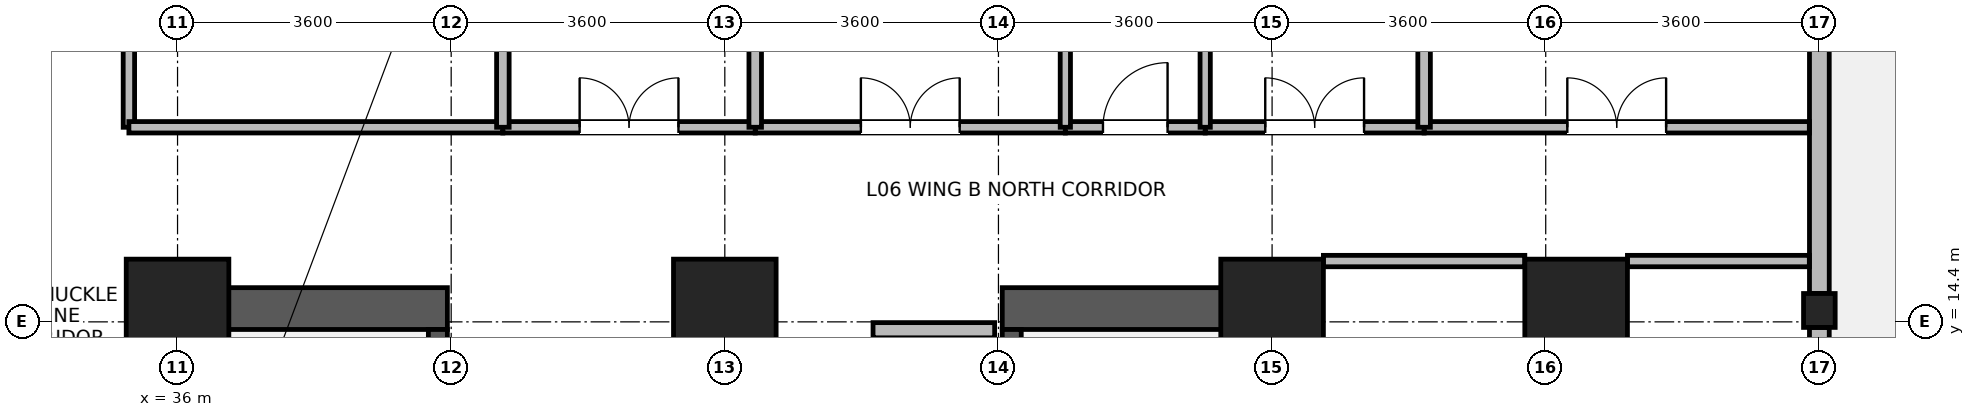
"""IFC4 building model, lengths in metres.
Left out: names, types, materials, properties, quantities, classifications, styles, units other than length and angle.
Written with IfcOpenShell. Run it as: python <this file> out.ifc"""

import sys

from ifc_helpers import new_model, si_unit, direction, frame, frame_2d, origin, origin_2d, place, context, subcontext, project, spatial, rectangle, i_section, extrude, source, transform, mapped, element, fill, save


model = new_model("IFC4")
c1 = context("Model", 3, precision=1e-05, world=origin(), true_north=direction((0.0, 1.0)))
c2 = subcontext(c1, "Body", "Model", "MODEL_VIEW")
j1 = project(units=[si_unit("LENGTHUNIT", "METRE"), si_unit("PLANEANGLEUNIT", "RADIAN")], contexts=[c1])
p1 = place(None, origin())
s1 = spatial("IfcSite", under=j1, at=p1, CompositionType="ELEMENT")
p2 = place(p1, origin())
s2 = spatial("IfcBuilding", under=s1, at=p2, CompositionType="ELEMENT")
p3 = place(p2, frame((0.0, 0.0, 29.0)))
s3 = spatial("IfcBuildingStorey", under=s2, at=p3, CompositionType="ELEMENT", Elevation=29.0)
for number, where, z_axis, x_axis in (
    (1, (36.075, 6.75, 0.0), (0.0, 0.0, 1.0), (0.0, 1.0, 0.0)),
    (2, (50.325, 6.75, 0.0), (0.0, 0.0, 1.0), (0.0, 1.0, 0.0)),
):
    element("IfcWall", number, at=place(p3, frame(where, z_axis=z_axis, x_axis=x_axis)), inside=s3, PredefinedType="SHEAR", context=c2, shape_type="SweptSolid", body=[
        extrude(rectangle(XDim=8.1, YDim=0.55, at=frame_2d((4.05, 0.0))), origin(), (0.0, 0.0, 1.0), 3.45),
    ])
for number, where, z_axis, x_axis in (
    (3, (36.35, 14.575, 0.0), (0.0, 0.0, 1.0), (1.0, 0.0, 0.0)),
    (4, (46.85, 14.575, 0.0), (0.0, 0.0, 1.0), (1.0, 0.0, 0.0)),
):
    element("IfcWall", number, at=place(p3, frame(where, z_axis=z_axis, x_axis=x_axis)), inside=s3, PredefinedType="SHEAR", context=c2, shape_type="SweptSolid", body=[
        extrude(rectangle(XDim=3.2, YDim=0.55, at=frame_2d((1.6, 0.0))), origin(), (0.0, 0.0, 1.0), 3.45),
    ])
p4 = place(p3, frame((39.425, 7.3, 0.0), z_axis=(0.0, 0.0, 1.0), x_axis=(0.0, 1.0, 0.0)))
e5 = element("IfcWall", 5, at=p4, inside=s3, PredefinedType="SHEAR", context=c2, shape_type="SweptSolid", body=[
    extrude(rectangle(XDim=7.0, YDim=0.25, at=frame_2d((3.5, 0.0))), origin(), (0.0, 0.0, 1.0), 3.45),
])
p5 = place(p4, frame((0.15, 0.0, 0.0)))
e6 = element("IfcOpeningElement", 6, at=p5, cuts=e5, PredefinedType="OPENING", context=c2, shape_type="SweptSolid", body=[
    extrude(rectangle(XDim=1.1, YDim=2.08, at=frame_2d((0.55, 1.04))), frame((0.0, 0.135, 0.0), z_axis=(0.0, -1.0, 0.0), x_axis=(1.0, 0.0, 0.0)), (0.0, 0.0, 1.0), 0.27),
])
p6 = place(p3, frame((46.975, 7.3, 0.0), z_axis=(0.0, 0.0, 1.0), x_axis=(0.0, 1.0, 0.0)))
e7 = element("IfcWall", 7, at=p6, inside=s3, PredefinedType="SHEAR", context=c2, shape_type="SweptSolid", body=[
    extrude(rectangle(XDim=7.0, YDim=0.25, at=frame_2d((3.5, 0.0))), origin(), (0.0, 0.0, 1.0), 3.45),
])
p7 = place(p6, frame((0.15, 0.0, 0.0)))
e8 = element("IfcOpeningElement", 8, at=p7, cuts=e7, PredefinedType="OPENING", context=c2, shape_type="SweptSolid", body=[
    extrude(rectangle(XDim=1.1, YDim=2.08, at=frame_2d((0.55, 1.04))), frame((0.0, 0.135, 0.0), z_axis=(0.0, -1.0, 0.0), x_axis=(1.0, 0.0, 0.0)), (0.0, 0.0, 1.0), 0.27),
])
m1 = source(origin(), c2, "Body", "SweptSolid", [
    extrude(rectangle(XDim=1.35, YDim=1.35, at=origin_2d()), origin(), (0.0, 0.0, 1.0), 3.7),
])
for number, where, z_axis, x_axis in (
    (9, (36.0, 14.55, 0.0), (0.0, 0.0, 1.0), (1.0, 0.0, 0.0)),
    (10, (43.2, 14.55, 0.0), (0.0, 0.0, 1.0), (1.0, 0.0, 0.0)),
    (11, (50.4, 14.55, 0.0), (0.0, 0.0, 1.0), (1.0, 0.0, 0.0)),
    (12, (54.4, 14.55, 0.0), (0.0, 0.0, 1.0), (1.0, 0.0, 0.0)),
):
    element("IfcColumn", number, at=place(p3, frame(where, z_axis=z_axis, x_axis=x_axis)), inside=s3, PredefinedType="COLUMN", context=c2, shape_type="MappedRepresentation", body=[
        mapped(m1, transform((0.0, 0.0, 0.0), x_axis=(1.0, 0.0, 0.0), y_axis=(0.0, 1.0, 0.0), z_axis=(0.0, 0.0, 1.0), scale=1.0)),
    ])
m2 = source(origin(), c2, "Body", "SweptSolid", [
    extrude(i_section(OverallWidth=0.416, OverallDepth=0.446, WebThickness=0.029, FlangeThickness=0.04, FilletRadius=0.015, at=origin_2d()), origin(), (0.0, 0.0, 1.0), 3.7),
])
p8 = place(p3, frame((57.6, 14.55, 0.0), z_axis=(0.0, 0.0, 1.0), x_axis=(1.0, 0.0, 0.0)))
e13 = element("IfcColumn", 13, at=p8, inside=s3, PredefinedType="COLUMN", context=c2, shape_type="MappedRepresentation", body=[
    mapped(m2, transform((0.0, 0.0, 0.0), x_axis=(1.0, 0.0, 0.0), y_axis=(0.0, 1.0, 0.0), z_axis=(0.0, 0.0, 1.0), scale=1.0)),
])
p9 = place(p3, frame((57.6, 14.326, 0.0), z_axis=(0.0, 0.0, 1.0), x_axis=(0.0, -1.0, 0.0)))
e14 = element("IfcWall", 14, at=p9, inside=s3, PredefinedType="STANDARD", context=c2, shape_type="SweptSolid", body=[
    extrude(rectangle(XDim=7.052, YDim=0.26, at=frame_2d((3.526, 0.0))), origin(), (0.0, 0.0, 1.0), 2.93),
])
p10 = place(p9, frame((0.863, 0.0, 0.85)))
e15 = element("IfcOpeningElement", 15, at=p10, cuts=e14, PredefinedType="OPENING", context=c2, shape_type="SweptSolid", body=[
    extrude(rectangle(XDim=1.8, YDim=1.85, at=frame_2d((0.9, 0.925))), frame((0.0, 0.14, 0.0), z_axis=(0.0, -1.0, 0.0), x_axis=(1.0, 0.0, 0.0)), (0.0, 0.0, 1.0), 0.28),
])
p11 = place(p9, frame((4.389, 0.0, 0.85)))
e16 = element("IfcOpeningElement", 16, at=p11, cuts=e14, PredefinedType="OPENING", context=c2, shape_type="SweptSolid", body=[
    extrude(rectangle(XDim=1.8, YDim=1.85, at=frame_2d((0.9, 0.925))), frame((0.0, 0.14, 0.0), z_axis=(0.0, -1.0, 0.0), x_axis=(1.0, 0.0, 0.0)), (0.0, 0.0, 1.0), 0.28),
])
p12 = place(p3, frame((57.6, 21.376, 0.0), z_axis=(0.0, 0.0, 1.0), x_axis=(0.0, -1.0, 0.0)))
e17 = element("IfcWall", 17, at=p12, inside=s3, PredefinedType="STANDARD", context=c2, shape_type="SweptSolid", body=[
    extrude(rectangle(XDim=6.602, YDim=0.26, at=frame_2d((3.301, 0.0))), origin(), (0.0, 0.0, 1.0), 2.93),
])
p13 = place(p12, frame((0.75, 0.0, 0.85)))
e18 = element("IfcOpeningElement", 18, at=p13, cuts=e17, PredefinedType="OPENING", context=c2, shape_type="SweptSolid", body=[
    extrude(rectangle(XDim=1.8, YDim=1.85, at=frame_2d((0.9, 0.925))), frame((0.0, 0.14, 0.0), z_axis=(0.0, -1.0, 0.0), x_axis=(1.0, 0.0, 0.0)), (0.0, 0.0, 1.0), 0.28),
])
p14 = place(p3, frame((45.15, 14.29, 0.0), z_axis=(0.0, 0.0, 1.0), x_axis=(1.0, 0.0, 0.0)))
e19 = element("IfcWall", 19, at=p14, inside=s3, PredefinedType="PARTITIONING", context=c2, shape_type="SweptSolid", body=[
    extrude(rectangle(XDim=1.6, YDim=0.2, at=frame_2d((0.8, 0.0))), origin(), (0.0, 0.0, 1.0), 2.23),
])
p15 = place(p3, frame((35.36, 16.96, 0.0), z_axis=(0.0, 0.0, 1.0), x_axis=(0.0, 1.0, 0.0)))
e20 = element("IfcWall", 20, at=p15, inside=s3, PredefinedType="PARTITIONING", context=c2, shape_type="SweptSolid", body=[
    extrude(rectangle(XDim=3.965, YDim=0.15, at=frame_2d((1.982, 0.0))), origin(), (0.0, 0.0, 1.0), 3.43),
])
p16 = place(p15, frame((1.333, 0.0, 0.0)))
e21 = element("IfcOpeningElement", 21, at=p16, cuts=e20, PredefinedType="OPENING", context=c2, shape_type="SweptSolid", body=[
    extrude(rectangle(XDim=1.3, YDim=2.12, at=frame_2d((0.65, 1.06))), frame((0.0, 0.085, 0.0), z_axis=(0.0, -1.0, 0.0), x_axis=(1.0, 0.0, 0.0)), (0.0, 0.0, 1.0), 0.17),
])
p17 = place(p3, frame((51.075, 15.2, 0.0), z_axis=(0.0, 0.0, 1.0), x_axis=(1.0, 0.0, 0.0)))
e22 = element("IfcWall", 22, at=p17, inside=s3, PredefinedType="PARTITIONING", context=c2, shape_type="SweptSolid", body=[
    extrude(rectangle(XDim=2.65, YDim=0.15, at=frame_2d((1.325, 0.0))), origin(), (0.0, 0.0, 1.0), 3.43),
])
p18 = place(p3, frame((55.075, 15.2, 0.0), z_axis=(0.0, 0.0, 1.0), x_axis=(1.0, 0.0, 0.0)))
e23 = element("IfcWall", 23, at=p18, inside=s3, PredefinedType="PARTITIONING", context=c2, shape_type="SweptSolid", body=[
    extrude(rectangle(XDim=2.393, YDim=0.15, at=frame_2d((1.197, 0.0))), origin(), (0.0, 0.0, 1.0), 3.43),
])
p19 = place(p3, frame((52.4, 16.96, 0.0), z_axis=(0.0, 0.0, 1.0), x_axis=(1.0, 0.0, 0.0)))
e24 = element("IfcWall", 24, at=p19, inside=s3, PredefinedType="PARTITIONING", context=c2, shape_type="SweptSolid", body=[
    extrude(rectangle(XDim=5.068, YDim=0.15, at=frame_2d((2.534, 0.0))), origin(), (0.0, 0.0, 1.0), 3.43),
])
p20 = place(p19, frame((1.884, 0.0, 0.0)))
e25 = element("IfcOpeningElement", 25, at=p20, cuts=e24, PredefinedType="OPENING", context=c2, shape_type="SweptSolid", body=[
    extrude(rectangle(XDim=1.3, YDim=2.12, at=frame_2d((0.65, 1.06))), frame((0.0, 0.085, 0.0), z_axis=(0.0, -1.0, 0.0), x_axis=(1.0, 0.0, 0.0)), (0.0, 0.0, 1.0), 0.17),
])
p21 = place(p3, frame((35.36, 16.96, 0.0), z_axis=(0.0, 0.0, 1.0), x_axis=(1.0, 0.0, 0.0)))
e26 = element("IfcWall", 26, at=p21, inside=s3, PredefinedType="PARTITIONING", context=c2, shape_type="SweptSolid", body=[
    extrude(rectangle(XDim=4.92, YDim=0.15, at=frame_2d((2.46, 0.0))), origin(), (0.0, 0.0, 1.0), 3.43),
])
p22 = place(p3, frame((43.6, 16.96, 0.0), z_axis=(0.0, 0.0, 1.0), x_axis=(1.0, 0.0, 0.0)))
e27 = element("IfcWall", 27, at=p22, inside=s3, PredefinedType="PARTITIONING", context=c2, shape_type="SweptSolid", body=[
    extrude(rectangle(XDim=4.08, YDim=0.15, at=frame_2d((2.04, 0.0))), origin(), (0.0, 0.0, 1.0), 3.43),
])
p23 = place(p22, frame((1.39, 0.0, 0.0)))
e28 = element("IfcOpeningElement", 28, at=p23, cuts=e27, PredefinedType="OPENING", context=c2, shape_type="SweptSolid", body=[
    extrude(rectangle(XDim=1.3, YDim=2.12, at=frame_2d((0.65, 1.06))), frame((0.0, 0.085, 0.0), z_axis=(0.0, -1.0, 0.0), x_axis=(1.0, 0.0, 0.0)), (0.0, 0.0, 1.0), 0.17),
])
p24 = place(p3, frame((40.28, 16.96, 0.0), z_axis=(0.0, 0.0, 1.0), x_axis=(1.0, 0.0, 0.0)))
e29 = element("IfcWall", 29, at=p24, inside=s3, PredefinedType="PARTITIONING", context=c2, shape_type="SweptSolid", body=[
    extrude(rectangle(XDim=3.32, YDim=0.15, at=frame_2d((1.66, 0.0))), origin(), (0.0, 0.0, 1.0), 3.43),
])
p25 = place(p24, frame((1.01, 0.0, 0.0)))
e30 = element("IfcOpeningElement", 30, at=p25, cuts=e29, PredefinedType="OPENING", context=c2, shape_type="SweptSolid", body=[
    extrude(rectangle(XDim=1.3, YDim=2.12, at=frame_2d((0.65, 1.06))), frame((0.0, 0.085, 0.0), z_axis=(0.0, -1.0, 0.0), x_axis=(1.0, 0.0, 0.0)), (0.0, 0.0, 1.0), 0.17),
])
p26 = place(p3, frame((49.52, 16.96, 0.0), z_axis=(0.0, 0.0, 1.0), x_axis=(1.0, 0.0, 0.0)))
e31 = element("IfcWall", 31, at=p26, inside=s3, PredefinedType="PARTITIONING", context=c2, shape_type="SweptSolid", body=[
    extrude(rectangle(XDim=2.88, YDim=0.15, at=frame_2d((1.44, 0.0))), origin(), (0.0, 0.0, 1.0), 3.43),
])
p27 = place(p26, frame((0.79, 0.0, 0.0)))
e32 = element("IfcOpeningElement", 32, at=p27, cuts=e31, PredefinedType="OPENING", context=c2, shape_type="SweptSolid", body=[
    extrude(rectangle(XDim=1.3, YDim=2.12, at=frame_2d((0.65, 1.06))), frame((0.0, 0.085, 0.0), z_axis=(0.0, -1.0, 0.0), x_axis=(1.0, 0.0, 0.0)), (0.0, 0.0, 1.0), 0.17),
])
p28 = place(p3, frame((47.68, 16.96, 0.0), z_axis=(0.0, 0.0, 1.0), x_axis=(1.0, 0.0, 0.0)))
e33 = element("IfcWall", 33, at=p28, inside=s3, PredefinedType="PARTITIONING", context=c2, shape_type="SweptSolid", body=[
    extrude(rectangle(XDim=1.84, YDim=0.15, at=frame_2d((0.92, 0.0))), origin(), (0.0, 0.0, 1.0), 3.43),
])
p29 = place(p28, frame((0.495, 0.0, 0.0)))
e34 = element("IfcOpeningElement", 34, at=p29, cuts=e33, PredefinedType="OPENING", context=c2, shape_type="SweptSolid", body=[
    extrude(rectangle(XDim=0.85, YDim=2.04, at=frame_2d((0.425, 1.02))), frame((0.0, 0.085, 0.0), z_axis=(0.0, -1.0, 0.0), x_axis=(1.0, 0.0, 0.0)), (0.0, 0.0, 1.0), 0.17),
])
for number, where, z_axis, x_axis in (
    (35, (40.28, 16.96, 0.0), (0.0, 0.0, 1.0), (0.0, 1.0, 0.0)),
    (36, (43.6, 16.96, 0.0), (0.0, 0.0, 1.0), (0.0, 1.0, 0.0)),
):
    element("IfcWall", number, at=place(p3, frame(where, z_axis=z_axis, x_axis=x_axis)), inside=s3, PredefinedType="PARTITIONING", context=c2, shape_type="SweptSolid", body=[
        extrude(rectangle(XDim=9.8, YDim=0.165, at=frame_2d((4.9, 0.0))), origin(), (0.0, 0.0, 1.0), 3.43),
    ])
for number, where, z_axis, x_axis in (
    (37, (47.68, 16.96, 0.0), (0.0, 0.0, 1.0), (0.0, 1.0, 0.0)),
    (38, (49.52, 16.96, 0.0), (0.0, 0.0, 1.0), (0.0, 1.0, 0.0)),
):
    element("IfcWall", number, at=place(p3, frame(where, z_axis=z_axis, x_axis=x_axis)), inside=s3, PredefinedType="PARTITIONING", context=c2, shape_type="SweptSolid", body=[
        extrude(rectangle(XDim=9.8, YDim=0.135, at=frame_2d((4.9, 0.0))), origin(), (0.0, 0.0, 1.0), 3.43),
    ])
p30 = place(p3, frame((52.4, 16.96, 0.0), z_axis=(0.0, 0.0, 1.0), x_axis=(0.0, 1.0, 0.0)))
e39 = element("IfcWall", 39, at=p30, inside=s3, PredefinedType="PARTITIONING", context=c2, shape_type="SweptSolid", body=[
    extrude(rectangle(XDim=9.8, YDim=0.165, at=frame_2d((4.9, 0.0))), origin(), (0.0, 0.0, 1.0), 3.43),
])
p31 = place(p20, origin())
e40 = element("IfcDoor", 40, at=p31, inside=s3, OperationType="DOUBLE_DOOR_SINGLE_SWING", PredefinedType="DOOR", context=c2, shape_type="SweptSolid", body=[
    extrude(rectangle(XDim=1.3, YDim=2.12, at=frame_2d((0.65, 1.06))), frame((0.0, 0.025, 0.0), z_axis=(0.0, -1.0, 0.0), x_axis=(1.0, 0.0, 0.0)), (0.0, 0.0, 1.0), 0.05),
])
fill(e25, e40)
p32 = place(p23, origin())
e41 = element("IfcDoor", 41, at=p32, inside=s3, OperationType="DOUBLE_DOOR_SINGLE_SWING", PredefinedType="DOOR", context=c2, shape_type="SweptSolid", body=[
    extrude(rectangle(XDim=1.3, YDim=2.12, at=frame_2d((0.65, 1.06))), frame((0.0, 0.025, 0.0), z_axis=(0.0, -1.0, 0.0), x_axis=(1.0, 0.0, 0.0)), (0.0, 0.0, 1.0), 0.05),
])
fill(e28, e41)
p33 = place(p25, origin())
e42 = element("IfcDoor", 42, at=p33, inside=s3, OperationType="DOUBLE_DOOR_SINGLE_SWING", PredefinedType="DOOR", context=c2, shape_type="SweptSolid", body=[
    extrude(rectangle(XDim=1.3, YDim=2.12, at=frame_2d((0.65, 1.06))), frame((0.0, 0.025, 0.0), z_axis=(0.0, -1.0, 0.0), x_axis=(1.0, 0.0, 0.0)), (0.0, 0.0, 1.0), 0.05),
])
fill(e30, e42)
p34 = place(p27, origin())
e43 = element("IfcDoor", 43, at=p34, inside=s3, OperationType="DOUBLE_DOOR_SINGLE_SWING", PredefinedType="DOOR", context=c2, shape_type="SweptSolid", body=[
    extrude(rectangle(XDim=1.3, YDim=2.12, at=frame_2d((0.65, 1.06))), frame((0.0, 0.025, 0.0), z_axis=(0.0, -1.0, 0.0), x_axis=(1.0, 0.0, 0.0)), (0.0, 0.0, 1.0), 0.05),
])
fill(e32, e43)
p35 = place(p29, origin())
e44 = element("IfcDoor", 44, at=p35, inside=s3, OperationType="SINGLE_SWING_RIGHT", PredefinedType="DOOR", context=c2, shape_type="SweptSolid", body=[
    extrude(rectangle(XDim=0.85, YDim=2.04, at=frame_2d((0.425, 1.02))), frame((0.0, 0.025, 0.0), z_axis=(0.0, -1.0, 0.0), x_axis=(1.0, 0.0, 0.0)), (0.0, 0.0, 1.0), 0.05),
])
fill(e34, e44)
save(model, sys.argv[1])
